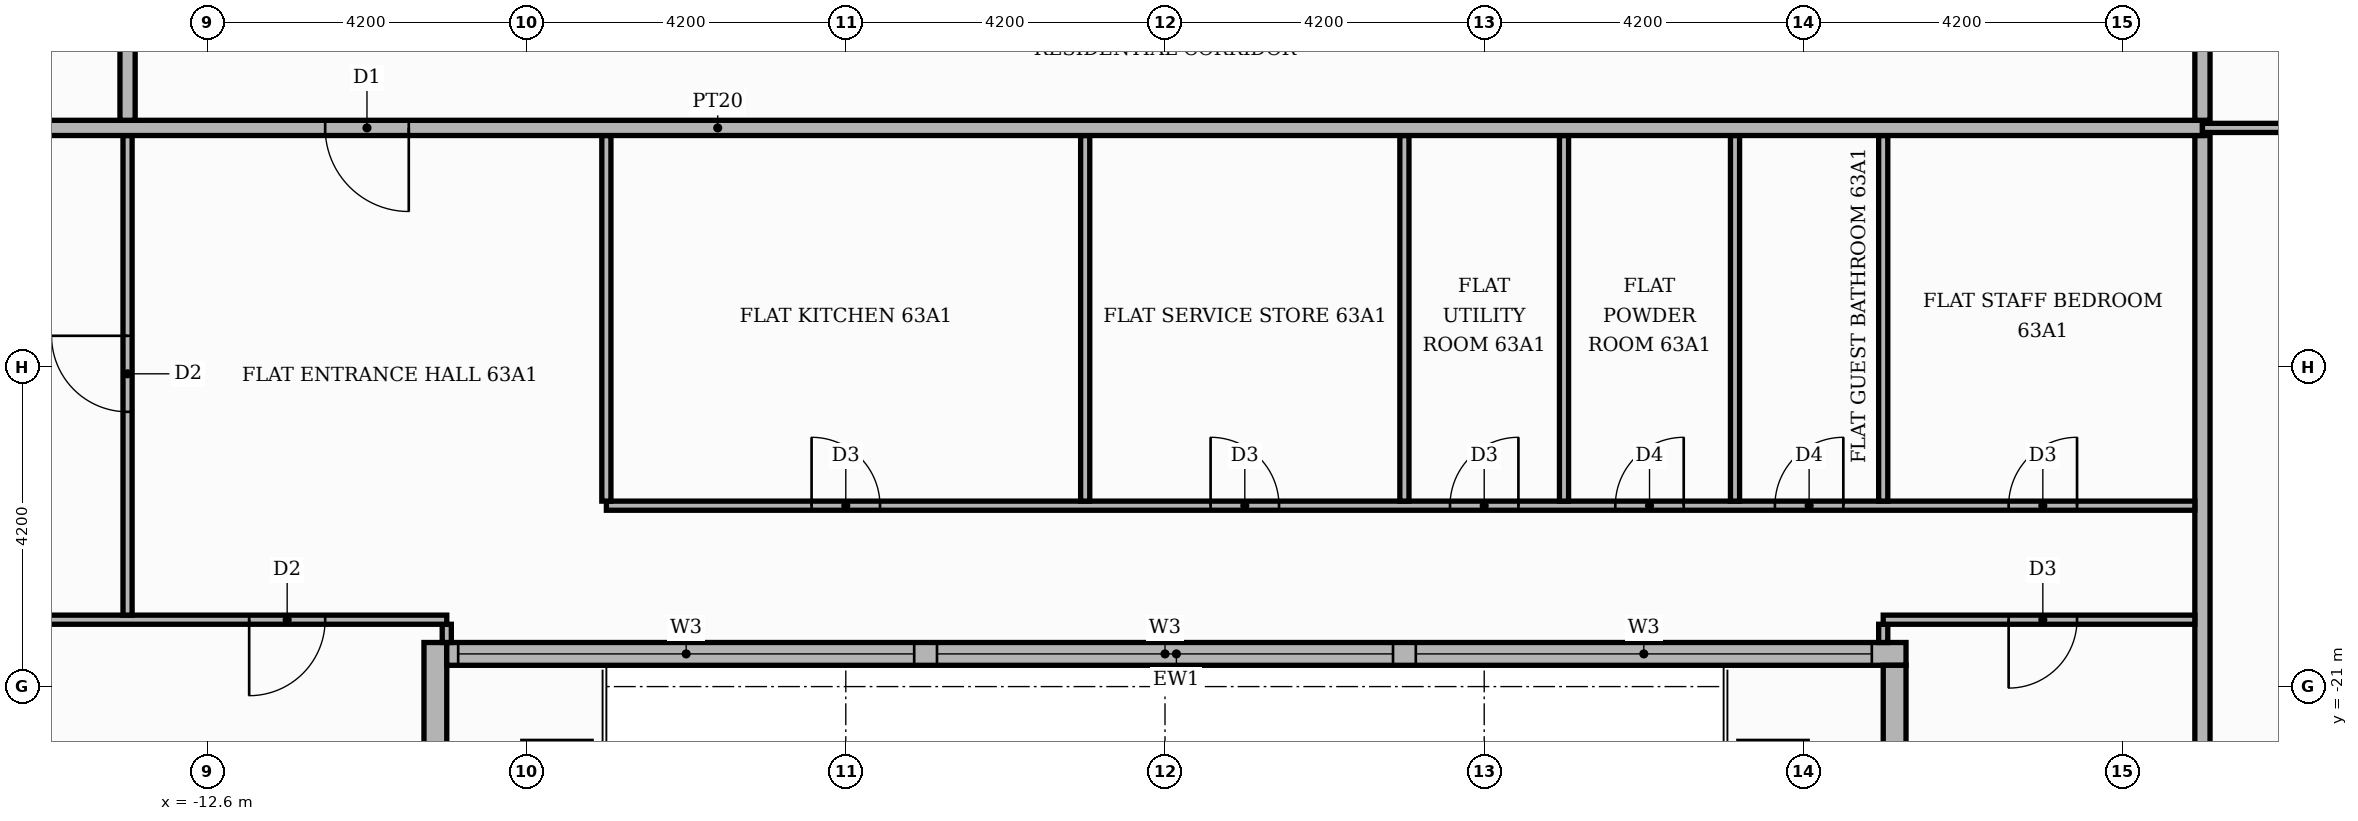
"""IFC4 building model, lengths in metres.
Left out: names, types, materials, properties, quantities, classifications, styles, units other than length and angle.
Written with IfcOpenShell. Run it as: python <this file> out.ifc"""

import sys

from ifc_helpers import new_model, si_unit, direction, frame, frame_2d, origin, place, context, subcontext, project, spatial, rectangle, extrude, element, fill, save


model = new_model("IFC4")
c1 = context("Model", 3, precision=1e-05, world=origin(), true_north=direction((0.0, 1.0)))
c2 = subcontext(c1, "Body", "Model", "MODEL_VIEW")
j1 = project(units=[si_unit("LENGTHUNIT", "METRE"), si_unit("PLANEANGLEUNIT", "RADIAN")], contexts=[c1])
p1 = place(None, origin())
s1 = spatial("IfcSite", under=j1, at=p1, CompositionType="ELEMENT")
p2 = place(p1, origin())
s2 = spatial("IfcBuilding", under=s1, at=p2, CompositionType="ELEMENT")
p3 = place(p2, frame((0.0, 0.0, 264.0)))
s3 = spatial("IfcBuildingStorey", under=s2, at=p3, CompositionType="ELEMENT", Elevation=264.0)
p4 = place(p3, frame((-9.6, -25.42, 0.0), z_axis=(0.0, 0.0, 1.0), x_axis=(0.0, 1.0, 0.0)))
e1 = element("IfcWall", 1, at=p4, inside=s3, PredefinedType="STANDARD", context=c2, shape_type="SweptSolid", body=[
    extrude(rectangle(XDim=5.0, YDim=0.3, at=frame_2d((2.5, 0.0))), origin(), (0.0, 0.0, 1.0), 3.48),
])
p5 = place(p4, frame((1.42, 0.0, 0.0)))
e2 = element("IfcOpeningElement", 2, at=p5, cuts=e1, PredefinedType="OPENING", context=c2, shape_type="SweptSolid", body=[
    extrude(rectangle(XDim=1.8, YDim=2.4, at=frame_2d((0.9, 1.2))), frame((0.0, 0.16, 0.0), z_axis=(0.0, -1.0, 0.0), x_axis=(1.0, 0.0, 0.0)), (0.0, 0.0, 1.0), 0.32),
])
p6 = place(p3, frame((-9.45, -20.57, 0.0), z_axis=(0.0, 0.0, 1.0), x_axis=(1.0, 0.0, 0.0)))
e3 = element("IfcWall", 3, at=p6, inside=s3, PredefinedType="STANDARD", context=c2, shape_type="SweptSolid", body=[
    extrude(rectangle(XDim=19.2, YDim=0.3, at=frame_2d((9.6, 0.0))), origin(), (0.0, 0.0, 1.0), 3.48),
])
p7 = place(p6, frame((0.15, 0.0, 0.9)))
e4 = element("IfcOpeningElement", 4, at=p7, cuts=e3, PredefinedType="OPENING", context=c2, shape_type="SweptSolid", body=[
    extrude(rectangle(XDim=6.0, YDim=2.1, at=frame_2d((3.0, 1.05))), frame((0.0, 0.16, 0.0), z_axis=(0.0, -1.0, 0.0), x_axis=(1.0, 0.0, 0.0)), (0.0, 0.0, 1.0), 0.32),
])
p8 = place(p6, frame((6.45, 0.0, 0.9)))
e5 = element("IfcOpeningElement", 5, at=p8, cuts=e3, PredefinedType="OPENING", context=c2, shape_type="SweptSolid", body=[
    extrude(rectangle(XDim=6.0, YDim=2.1, at=frame_2d((3.0, 1.05))), frame((0.0, 0.16, 0.0), z_axis=(0.0, -1.0, 0.0), x_axis=(1.0, 0.0, 0.0)), (0.0, 0.0, 1.0), 0.32),
])
p9 = place(p6, frame((12.75, 0.0, 0.9)))
e6 = element("IfcOpeningElement", 6, at=p9, cuts=e3, PredefinedType="OPENING", context=c2, shape_type="SweptSolid", body=[
    extrude(rectangle(XDim=6.0, YDim=2.1, at=frame_2d((3.0, 1.05))), frame((0.0, 0.16, 0.0), z_axis=(0.0, -1.0, 0.0), x_axis=(1.0, 0.0, 0.0)), (0.0, 0.0, 1.0), 0.32),
])
p10 = place(p3, frame((9.6, -20.72, 0.0), z_axis=(0.0, 0.0, 1.0), x_axis=(0.0, -1.0, 0.0)))
e7 = element("IfcWall", 7, at=p10, inside=s3, PredefinedType="STANDARD", context=c2, shape_type="SweptSolid", body=[
    extrude(rectangle(XDim=5.0, YDim=0.3, at=frame_2d((2.5, 0.0))), origin(), (0.0, 0.0, 1.0), 3.48),
])
p11 = place(p10, frame((1.48, 0.0, 0.0)))
e8 = element("IfcOpeningElement", 8, at=p11, cuts=e7, PredefinedType="OPENING", context=c2, shape_type="SweptSolid", body=[
    extrude(rectangle(XDim=1.8, YDim=2.4, at=frame_2d((0.9, 1.2))), frame((0.0, 0.16, 0.0), z_axis=(0.0, -1.0, 0.0), x_axis=(1.0, 0.0, 0.0)), (0.0, 0.0, 1.0), 0.32),
])
p12 = place(p3, frame((13.65, -25.42, 0.0), z_axis=(0.0, 0.0, 1.0), x_axis=(0.0, 1.0, 0.0)))
e9 = element("IfcWall", 9, at=p12, inside=s3, PredefinedType="PARTITIONING", context=c2, shape_type="SweptSolid", body=[
    extrude(rectangle(XDim=11.67, YDim=0.2, at=frame_2d((5.835, 0.0))), origin(), (0.0, 0.0, 1.0), 3.48),
])
for number, where, z_axis, x_axis in (
    (10, (-9.45, -20.42, 0.0), (0.0, 0.0, 1.0), (0.0, 1.0, 0.0)),
    (11, (9.45, -20.42, 0.0), (0.0, 0.0, 1.0), (0.0, 1.0, 0.0)),
):
    element("IfcWall", number, at=place(p3, frame(where, z_axis=z_axis, x_axis=x_axis)), inside=s3, PredefinedType="PARTITIONING", context=c2, shape_type="SweptSolid", body=[
        extrude(rectangle(XDim=0.24, YDim=0.12, at=frame_2d((0.12, 0.0))), origin(), (0.0, 0.0, 1.0), 3.48),
    ])
p13 = place(p3, frame((-20.719, -20.12, 0.0), z_axis=(0.0, 0.0, 1.0), x_axis=(1.0, 0.0, 0.0)))
e12 = element("IfcWall", 12, at=p13, inside=s3, PredefinedType="PARTITIONING", context=c2, shape_type="SweptSolid", body=[
    extrude(rectangle(XDim=11.269, YDim=0.12, at=frame_2d((5.635, 0.0))), origin(), (0.0, 0.0, 1.0), 3.48),
])
p14 = place(p13, frame((8.669, 0.0, 0.0)))
e13 = element("IfcOpeningElement", 13, at=p14, cuts=e12, PredefinedType="OPENING", context=c2, shape_type="SweptSolid", body=[
    extrude(rectangle(XDim=1.0, YDim=2.1, at=frame_2d((0.5, 1.05))), frame((0.0, 0.07, 0.0), z_axis=(0.0, -1.0, 0.0), x_axis=(1.0, 0.0, 0.0)), (0.0, 0.0, 1.0), 0.14),
])
p15 = place(p3, frame((9.45, -20.12, 0.0), z_axis=(0.0, 0.0, 1.0), x_axis=(1.0, 0.0, 0.0)))
e14 = element("IfcWall", 14, at=p15, inside=s3, PredefinedType="PARTITIONING", context=c2, shape_type="SweptSolid", body=[
    extrude(rectangle(XDim=4.1, YDim=0.12, at=frame_2d((2.05, 0.0))), origin(), (0.0, 0.0, 1.0), 3.48),
])
p16 = place(p15, frame((1.65, 0.0, 0.0)))
e15 = element("IfcOpeningElement", 15, at=p16, cuts=e14, PredefinedType="OPENING", context=c2, shape_type="SweptSolid", body=[
    extrude(rectangle(XDim=0.9, YDim=2.1, at=frame_2d((0.45, 1.05))), frame((0.0, 0.07, 0.0), z_axis=(0.0, -1.0, 0.0), x_axis=(1.0, 0.0, 0.0)), (0.0, 0.0, 1.0), 0.14),
])
p17 = place(p3, frame((-13.65, -20.06, 0.0), z_axis=(0.0, 0.0, 1.0), x_axis=(0.0, 1.0, 0.0)))
e16 = element("IfcWall", 16, at=p17, inside=s3, PredefinedType="PARTITIONING", context=c2, shape_type="SweptSolid", body=[
    extrude(rectangle(XDim=6.31, YDim=0.12, at=frame_2d((3.155, 0.0))), origin(), (0.0, 0.0, 1.0), 3.48),
])
p18 = place(p17, frame((2.675, 0.0, 0.0)))
e17 = element("IfcOpeningElement", 17, at=p18, cuts=e16, PredefinedType="OPENING", context=c2, shape_type="SweptSolid", body=[
    extrude(rectangle(XDim=1.0, YDim=2.1, at=frame_2d((0.5, 1.05))), frame((0.0, 0.07, 0.0), z_axis=(0.0, -1.0, 0.0), x_axis=(1.0, 0.0, 0.0)), (0.0, 0.0, 1.0), 0.14),
])
p19 = place(p3, frame((-7.35, -18.62, 0.0), z_axis=(0.0, 0.0, 1.0), x_axis=(1.0, 0.0, 0.0)))
e18 = element("IfcWall", 18, at=p19, inside=s3, PredefinedType="PARTITIONING", context=c2, shape_type="SweptSolid", body=[
    extrude(rectangle(XDim=20.9, YDim=0.12, at=frame_2d((10.45, 0.0))), origin(), (0.0, 0.0, 1.0), 3.48),
])
p20 = place(p19, frame((2.7, 0.0, 0.0)))
e19 = element("IfcOpeningElement", 19, at=p20, cuts=e18, PredefinedType="OPENING", context=c2, shape_type="SweptSolid", body=[
    extrude(rectangle(XDim=0.9, YDim=2.1, at=frame_2d((0.45, 1.05))), frame((0.0, 0.07, 0.0), z_axis=(0.0, -1.0, 0.0), x_axis=(1.0, 0.0, 0.0)), (0.0, 0.0, 1.0), 0.14),
])
p21 = place(p19, frame((7.95, 0.0, 0.0)))
e20 = element("IfcOpeningElement", 20, at=p21, cuts=e18, PredefinedType="OPENING", context=c2, shape_type="SweptSolid", body=[
    extrude(rectangle(XDim=0.9, YDim=2.1, at=frame_2d((0.45, 1.05))), frame((0.0, 0.07, 0.0), z_axis=(0.0, -1.0, 0.0), x_axis=(1.0, 0.0, 0.0)), (0.0, 0.0, 1.0), 0.14),
])
p22 = place(p19, frame((11.1, 0.0, 0.0)))
e21 = element("IfcOpeningElement", 21, at=p22, cuts=e18, PredefinedType="OPENING", context=c2, shape_type="SweptSolid", body=[
    extrude(rectangle(XDim=0.9, YDim=2.1, at=frame_2d((0.45, 1.05))), frame((0.0, 0.07, 0.0), z_axis=(0.0, -1.0, 0.0), x_axis=(1.0, 0.0, 0.0)), (0.0, 0.0, 1.0), 0.14),
])
p23 = place(p19, frame((13.275, 0.0, 0.0)))
e22 = element("IfcOpeningElement", 22, at=p23, cuts=e18, PredefinedType="OPENING", context=c2, shape_type="SweptSolid", body=[
    extrude(rectangle(XDim=0.9, YDim=2.1, at=frame_2d((0.45, 1.05))), frame((0.0, 0.07, 0.0), z_axis=(0.0, -1.0, 0.0), x_axis=(1.0, 0.0, 0.0)), (0.0, 0.0, 1.0), 0.14),
])
p24 = place(p19, frame((15.375, 0.0, 0.0)))
e23 = element("IfcOpeningElement", 23, at=p24, cuts=e18, PredefinedType="OPENING", context=c2, shape_type="SweptSolid", body=[
    extrude(rectangle(XDim=0.9, YDim=2.1, at=frame_2d((0.45, 1.05))), frame((0.0, 0.07, 0.0), z_axis=(0.0, -1.0, 0.0), x_axis=(1.0, 0.0, 0.0)), (0.0, 0.0, 1.0), 0.14),
])
p25 = place(p19, frame((18.45, 0.0, 0.0)))
e24 = element("IfcOpeningElement", 24, at=p25, cuts=e18, PredefinedType="OPENING", context=c2, shape_type="SweptSolid", body=[
    extrude(rectangle(XDim=0.9, YDim=2.1, at=frame_2d((0.45, 1.05))), frame((0.0, 0.07, 0.0), z_axis=(0.0, -1.0, 0.0), x_axis=(1.0, 0.0, 0.0)), (0.0, 0.0, 1.0), 0.14),
])
for number, where, z_axis, x_axis in (
    (25, (-7.35, -18.56, 0.0), (0.0, 0.0, 1.0), (0.0, 1.0, 0.0)),
    (26, (-1.05, -18.56, 0.0), (0.0, 0.0, 1.0), (0.0, 1.0, 0.0)),
    (27, (3.15, -18.56, 0.0), (0.0, 0.0, 1.0), (0.0, 1.0, 0.0)),
    (28, (5.25, -18.56, 0.0), (0.0, 0.0, 1.0), (0.0, 1.0, 0.0)),
    (29, (7.5, -18.56, 0.0), (0.0, 0.0, 1.0), (0.0, 1.0, 0.0)),
    (30, (9.45, -18.56, 0.0), (0.0, 0.0, 1.0), (0.0, 1.0, 0.0)),
):
    element("IfcWall", number, at=place(p3, frame(where, z_axis=z_axis, x_axis=x_axis)), inside=s3, PredefinedType="PARTITIONING", context=c2, shape_type="SweptSolid", body=[
        extrude(rectangle(XDim=4.81, YDim=0.12, at=frame_2d((2.405, 0.0))), origin(), (0.0, 0.0, 1.0), 3.48),
    ])
p26 = place(p3, frame((-25.42, -13.65, 0.0), z_axis=(0.0, 0.0, 1.0), x_axis=(1.0, 0.0, 0.0)))
e31 = element("IfcWall", 31, at=p26, inside=s3, PredefinedType="PARTITIONING", context=c2, shape_type="SweptSolid", body=[
    extrude(rectangle(XDim=39.07, YDim=0.2, at=frame_2d((19.535, 0.0))), origin(), (0.0, 0.0, 1.0), 3.48),
])
p27 = place(p26, frame((14.37, 0.0, 0.0)))
e32 = element("IfcOpeningElement", 32, at=p27, cuts=e31, PredefinedType="OPENING", context=c2, shape_type="SweptSolid", body=[
    extrude(rectangle(XDim=1.1, YDim=2.4, at=frame_2d((0.55, 1.2))), frame((0.0, 0.11, 0.0), z_axis=(0.0, -1.0, 0.0), x_axis=(1.0, 0.0, 0.0)), (0.0, 0.0, 1.0), 0.22),
])
p28 = place(p3, frame((13.65, -13.65, 0.0), z_axis=(0.0, 0.0, 1.0), x_axis=(1.0, 0.0, 0.0)))
e33 = element("IfcWall", 33, at=p28, inside=s3, PredefinedType="PARTITIONING", context=c2, shape_type="SweptSolid", body=[
    extrude(rectangle(XDim=6.17, YDim=0.12, at=frame_2d((3.085, 0.0))), origin(), (0.0, 0.0, 1.0), 3.48),
])
p29 = place(p28, frame((2.635, 0.0, 0.0)))
e34 = element("IfcOpeningElement", 34, at=p29, cuts=e33, PredefinedType="OPENING", context=c2, shape_type="SweptSolid", body=[
    extrude(rectangle(XDim=0.9, YDim=2.1, at=frame_2d((0.45, 1.05))), frame((0.0, 0.07, 0.0), z_axis=(0.0, -1.0, 0.0), x_axis=(1.0, 0.0, 0.0)), (0.0, 0.0, 1.0), 0.14),
])
for number, where, z_axis, x_axis in (
    (35, (-13.65, -13.55, 0.0), (0.0, 0.0, 1.0), (0.0, 1.0, 0.0)),
    (36, (13.65, -13.55, 0.0), (0.0, 0.0, 1.0), (0.0, 1.0, 0.0)),
):
    element("IfcWall", number, at=place(p3, frame(where, z_axis=z_axis, x_axis=x_axis)), inside=s3, PredefinedType="PARTITIONING", context=c2, shape_type="SweptSolid", body=[
        extrude(rectangle(XDim=2.45, YDim=0.2, at=frame_2d((1.225, 0.0))), origin(), (0.0, 0.0, 1.0), 3.48),
    ])
p30 = place(p7, origin())
e37 = element("IfcWindow", 37, at=p30, inside=s3, PartitioningType="SINGLE_PANEL", PredefinedType="WINDOW", context=c2, shape_type="SweptSolid", body=[
    extrude(rectangle(XDim=6.0, YDim=2.1, at=frame_2d((3.0, 1.05))), frame((0.0, 0.03, 0.0), z_axis=(0.0, -1.0, 0.0), x_axis=(1.0, 0.0, 0.0)), (0.0, 0.0, 1.0), 0.06),
])
fill(e4, e37)
p31 = place(p8, origin())
e38 = element("IfcWindow", 38, at=p31, inside=s3, PartitioningType="SINGLE_PANEL", PredefinedType="WINDOW", context=c2, shape_type="SweptSolid", body=[
    extrude(rectangle(XDim=6.0, YDim=2.1, at=frame_2d((3.0, 1.05))), frame((0.0, 0.03, 0.0), z_axis=(0.0, -1.0, 0.0), x_axis=(1.0, 0.0, 0.0)), (0.0, 0.0, 1.0), 0.06),
])
fill(e5, e38)
p32 = place(p9, origin())
e39 = element("IfcWindow", 39, at=p32, inside=s3, PartitioningType="SINGLE_PANEL", PredefinedType="WINDOW", context=c2, shape_type="SweptSolid", body=[
    extrude(rectangle(XDim=6.0, YDim=2.1, at=frame_2d((3.0, 1.05))), frame((0.0, 0.03, 0.0), z_axis=(0.0, -1.0, 0.0), x_axis=(1.0, 0.0, 0.0)), (0.0, 0.0, 1.0), 0.06),
])
fill(e6, e39)
p33 = place(p27, frame((1.1, 0.0, 0.0), z_axis=(0.0, 0.0, 1.0), x_axis=(-1.0, 0.0, 0.0)))
e40 = element("IfcDoor", 40, at=p33, inside=s3, OperationType="SINGLE_SWING_RIGHT", PredefinedType="DOOR", context=c2, shape_type="SweptSolid", body=[
    extrude(rectangle(XDim=1.1, YDim=2.4, at=frame_2d((0.55, 1.2))), frame((0.0, 0.025, 0.0), z_axis=(0.0, -1.0, 0.0), x_axis=(1.0, 0.0, 0.0)), (0.0, 0.0, 1.0), 0.05),
])
fill(e32, e40)
p34 = place(p18, origin())
e41 = element("IfcDoor", 41, at=p34, inside=s3, OperationType="SINGLE_SWING_RIGHT", PredefinedType="DOOR", context=c2, shape_type="SweptSolid", body=[
    extrude(rectangle(XDim=1.0, YDim=2.1, at=frame_2d((0.5, 1.05))), frame((0.0, 0.025, 0.0), z_axis=(0.0, -1.0, 0.0), x_axis=(1.0, 0.0, 0.0)), (0.0, 0.0, 1.0), 0.05),
])
fill(e17, e41)
p35 = place(p20, origin())
e42 = element("IfcDoor", 42, at=p35, inside=s3, OperationType="SINGLE_SWING_LEFT", PredefinedType="DOOR", context=c2, shape_type="SweptSolid", body=[
    extrude(rectangle(XDim=0.9, YDim=2.1, at=frame_2d((0.45, 1.05))), frame((0.0, 0.025, 0.0), z_axis=(0.0, -1.0, 0.0), x_axis=(1.0, 0.0, 0.0)), (0.0, 0.0, 1.0), 0.05),
])
fill(e19, e42)
p36 = place(p21, origin())
e43 = element("IfcDoor", 43, at=p36, inside=s3, OperationType="SINGLE_SWING_LEFT", PredefinedType="DOOR", context=c2, shape_type="SweptSolid", body=[
    extrude(rectangle(XDim=0.9, YDim=2.1, at=frame_2d((0.45, 1.05))), frame((0.0, 0.025, 0.0), z_axis=(0.0, -1.0, 0.0), x_axis=(1.0, 0.0, 0.0)), (0.0, 0.0, 1.0), 0.05),
])
fill(e20, e43)
p37 = place(p22, origin())
e44 = element("IfcDoor", 44, at=p37, inside=s3, OperationType="SINGLE_SWING_RIGHT", PredefinedType="DOOR", context=c2, shape_type="SweptSolid", body=[
    extrude(rectangle(XDim=0.9, YDim=2.1, at=frame_2d((0.45, 1.05))), frame((0.0, 0.025, 0.0), z_axis=(0.0, -1.0, 0.0), x_axis=(1.0, 0.0, 0.0)), (0.0, 0.0, 1.0), 0.05),
])
fill(e21, e44)
p38 = place(p23, origin())
e45 = element("IfcDoor", 45, at=p38, inside=s3, OperationType="SINGLE_SWING_RIGHT", PredefinedType="DOOR", context=c2, shape_type="SweptSolid", body=[
    extrude(rectangle(XDim=0.9, YDim=2.1, at=frame_2d((0.45, 1.05))), frame((0.0, 0.025, 0.0), z_axis=(0.0, -1.0, 0.0), x_axis=(1.0, 0.0, 0.0)), (0.0, 0.0, 1.0), 0.05),
])
fill(e22, e45)
p39 = place(p24, origin())
e46 = element("IfcDoor", 46, at=p39, inside=s3, OperationType="SINGLE_SWING_RIGHT", PredefinedType="DOOR", context=c2, shape_type="SweptSolid", body=[
    extrude(rectangle(XDim=0.9, YDim=2.1, at=frame_2d((0.45, 1.05))), frame((0.0, 0.025, 0.0), z_axis=(0.0, -1.0, 0.0), x_axis=(1.0, 0.0, 0.0)), (0.0, 0.0, 1.0), 0.05),
])
fill(e23, e46)
p40 = place(p25, origin())
e47 = element("IfcDoor", 47, at=p40, inside=s3, OperationType="SINGLE_SWING_RIGHT", PredefinedType="DOOR", context=c2, shape_type="SweptSolid", body=[
    extrude(rectangle(XDim=0.9, YDim=2.1, at=frame_2d((0.45, 1.05))), frame((0.0, 0.025, 0.0), z_axis=(0.0, -1.0, 0.0), x_axis=(1.0, 0.0, 0.0)), (0.0, 0.0, 1.0), 0.05),
])
fill(e24, e47)
p41 = place(p14, frame((1.0, 0.0, 0.0), z_axis=(0.0, 0.0, 1.0), x_axis=(-1.0, 0.0, 0.0)))
e48 = element("IfcDoor", 48, at=p41, inside=s3, OperationType="SINGLE_SWING_LEFT", PredefinedType="DOOR", context=c2, shape_type="SweptSolid", body=[
    extrude(rectangle(XDim=1.0, YDim=2.1, at=frame_2d((0.5, 1.05))), frame((0.0, 0.025, 0.0), z_axis=(0.0, -1.0, 0.0), x_axis=(1.0, 0.0, 0.0)), (0.0, 0.0, 1.0), 0.05),
])
fill(e13, e48)
p42 = place(p16, frame((0.9, 0.0, 0.0), z_axis=(0.0, 0.0, 1.0), x_axis=(-1.0, 0.0, 0.0)))
e49 = element("IfcDoor", 49, at=p42, inside=s3, OperationType="SINGLE_SWING_LEFT", PredefinedType="DOOR", context=c2, shape_type="SweptSolid", body=[
    extrude(rectangle(XDim=0.9, YDim=2.1, at=frame_2d((0.45, 1.05))), frame((0.0, 0.025, 0.0), z_axis=(0.0, -1.0, 0.0), x_axis=(1.0, 0.0, 0.0)), (0.0, 0.0, 1.0), 0.05),
])
fill(e15, e49)
save(model, sys.argv[1])
